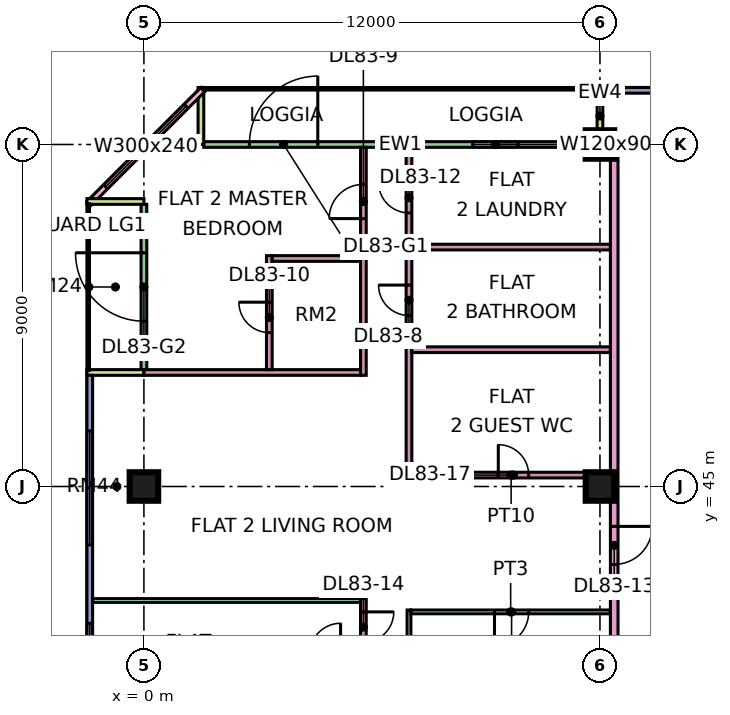
"""IFC4 building model, lengths in metres.
Left out: names, types, materials, properties, quantities, classifications, styles, units other than length and angle.
Written with IfcOpenShell. Run it as: python <this file> out.ifc"""

import sys

from ifc_helpers import new_model, si_unit, direction, frame, frame_2d, origin, origin_2d, place, context, subcontext, project, spatial, rectangle, extrude, element, fill, save


model = new_model("IFC4")
c1 = context("Model", 3, precision=1e-05, world=origin(), true_north=direction((0.0, 1.0)))
c2 = subcontext(c1, "Body", "Model", "MODEL_VIEW")
j1 = project(units=[si_unit("LENGTHUNIT", "METRE"), si_unit("PLANEANGLEUNIT", "RADIAN")], contexts=[c1])
p1 = place(None, origin())
s1 = spatial("IfcSite", under=j1, at=p1, CompositionType="ELEMENT")
p2 = place(p1, origin())
s2 = spatial("IfcBuilding", under=s1, at=p2, CompositionType="ELEMENT")
p3 = place(p2, frame((0.0, 0.0, 357.65)))
s3 = spatial("IfcBuildingStorey", under=s2, at=p3, CompositionType="ELEMENT", Elevation=357.65)
for number, where, z_axis, x_axis in (
    (1, (0.0, 45.0, 0.0), (0.0, 0.0, 1.0), (1.0, 0.0, 0.0)),
    (2, (12.0, 45.0, 0.0), (0.0, 0.0, 1.0), (1.0, 0.0, 0.0)),
    (3, (12.0, 54.0, 0.0), (0.0, 0.0, 1.0), (1.0, 0.0, 0.0)),
):
    element("IfcColumn", number, at=place(p3, frame(where, z_axis=z_axis, x_axis=x_axis)), inside=s3, PredefinedType="COLUMN", context=c2, shape_type="SweptSolid", body=[
        extrude(rectangle(XDim=0.75, YDim=0.75, at=origin_2d()), origin(), (0.0, 0.0, 1.0), 3.75),
    ])
p4 = place(p3, frame((22.5, 55.425, 0.0), z_axis=(0.0, 0.0, 1.0), x_axis=(-1.0, 0.0, 0.0)))
e4 = element("IfcWall", 4, at=p4, inside=s3, PredefinedType="SOLIDWALL", context=c2, shape_type="SweptSolid", body=[
    extrude(rectangle(XDim=10.425, YDim=0.15, at=frame_2d((5.212, 0.0))), origin(), (0.0, 0.0, 1.0), 3.35),
])
p5 = place(p4, frame((1.05, 0.0, 0.45)))
e5 = element("IfcOpeningElement", 5, at=p5, cuts=e4, PredefinedType="OPENING", context=c2, shape_type="SweptSolid", body=[
    extrude(rectangle(XDim=4.8, YDim=2.4, at=frame_2d((2.4, 1.2))), frame((0.0, 0.085, 0.0), z_axis=(0.0, -1.0, 0.0), x_axis=(1.0, 0.0, 0.0)), (0.0, 0.0, 1.0), 0.17),
])
p6 = place(p3, frame((11.925, 54.0, 0.0), z_axis=(0.0, 0.0, 1.0), x_axis=(-1.0, 0.0, 0.0)))
e6 = element("IfcWall", 6, at=p6, inside=s3, PredefinedType="SOLIDWALL", context=c2, shape_type="SweptSolid", body=[
    extrude(rectangle(XDim=10.35, YDim=0.15, at=frame_2d((5.175, 0.0))), origin(), (0.0, 0.0, 1.0), 3.35),
])
p7 = place(p6, frame((2.075, 0.0, 1.7)))
e7 = element("IfcOpeningElement", 7, at=p7, cuts=e6, PredefinedType="OPENING", context=c2, shape_type="SweptSolid", body=[
    extrude(rectangle(XDim=1.2, YDim=0.9, at=frame_2d((0.6, 0.45))), frame((0.0, 0.085, 0.0), z_axis=(0.0, -1.0, 0.0), x_axis=(1.0, 0.0, 0.0)), (0.0, 0.0, 1.0), 0.17),
])
p8 = place(p6, frame((7.35, 0.0, 0.0)))
e8 = element("IfcOpeningElement", 8, at=p8, cuts=e6, PredefinedType="OPENING", context=c2, shape_type="SweptSolid", body=[
    extrude(rectangle(XDim=1.8, YDim=2.4, at=frame_2d((0.9, 1.2))), frame((0.0, 0.085, 0.0), z_axis=(0.0, -1.0, 0.0), x_axis=(1.0, 0.0, 0.0)), (0.0, 0.0, 1.0), 0.17),
])
for number, where, z_axis, x_axis in (
    (9, (12.0, 55.5, 0.0), (0.0, 0.0, 1.0), (0.0, -1.0, 0.0)),
    (10, (1.5, 55.5, 0.0), (0.0, 0.0, 1.0), (0.0, -1.0, 0.0)),
):
    element("IfcWall", number, at=place(p3, frame(where, z_axis=z_axis, x_axis=x_axis)), inside=s3, PredefinedType="SOLIDWALL", context=c2, shape_type="SweptSolid", body=[
        extrude(rectangle(XDim=1.5, YDim=0.15, at=frame_2d((0.75, 0.0))), origin(), (0.0, 0.0, 1.0), 3.35),
    ])
p9 = place(p3, frame((1.553, 55.447, 0.0), z_axis=(0.0, 0.0, 1.0), x_axis=(-0.707106781187, -0.707106781187, 0.0)))
e11 = element("IfcWall", 11, at=p9, inside=s3, PredefinedType="SOLIDWALL", context=c2, shape_type="SweptSolid", body=[
    extrude(rectangle(XDim=4.243, YDim=0.15, at=frame_2d((2.121, 0.0))), origin(), (0.0, 0.0, 1.0), 3.35),
])
p10 = place(p9, frame((0.621, 0.0, 0.45)))
e12 = element("IfcOpeningElement", 12, at=p10, cuts=e11, PredefinedType="OPENING", context=c2, shape_type="SweptSolid", body=[
    extrude(rectangle(XDim=3.0, YDim=2.4, at=frame_2d((1.5, 1.2))), frame((0.0, 0.085, 0.0), z_axis=(0.0, -1.0, 0.0), x_axis=(1.0, 0.0, 0.0)), (0.0, 0.0, 1.0), 0.17),
])
p11 = place(p3, frame((0.0, 52.425, 0.0), z_axis=(0.0, 0.0, 1.0), x_axis=(0.0, -1.0, 0.0)))
e13 = element("IfcWall", 13, at=p11, inside=s3, PredefinedType="SOLIDWALL", context=c2, shape_type="SweptSolid", body=[
    extrude(rectangle(XDim=4.35, YDim=0.15, at=frame_2d((2.175, 0.0))), origin(), (0.0, 0.0, 1.0), 3.35),
])
p12 = place(p11, frame((1.275, 0.0, 0.0)))
e14 = element("IfcOpeningElement", 14, at=p12, cuts=e13, PredefinedType="OPENING", context=c2, shape_type="SweptSolid", body=[
    extrude(rectangle(XDim=1.8, YDim=2.4, at=frame_2d((0.9, 1.2))), frame((0.0, 0.085, 0.0), z_axis=(0.0, -1.0, 0.0), x_axis=(1.0, 0.0, 0.0)), (0.0, 0.0, 1.0), 0.17),
])
for number, where, z_axis, x_axis in (
    (15, (-1.5, 52.5, 0.0), (0.0, 0.0, 1.0), (1.0, 0.0, 0.0)),
    (16, (-1.5, 48.0, 0.0), (0.0, 0.0, 1.0), (1.0, 0.0, 0.0)),
):
    element("IfcWall", number, at=place(p3, frame(where, z_axis=z_axis, x_axis=x_axis)), inside=s3, PredefinedType="SOLIDWALL", context=c2, shape_type="SweptSolid", body=[
        extrude(rectangle(XDim=1.5, YDim=0.15, at=frame_2d((0.75, 0.0))), origin(), (0.0, 0.0, 1.0), 3.35),
    ])
p13 = place(p3, frame((-1.425, 47.925, 0.0), z_axis=(0.0, 0.0, 1.0), x_axis=(0.0, -1.0, 0.0)))
e17 = element("IfcWall", 17, at=p13, inside=s3, PredefinedType="SOLIDWALL", context=c2, shape_type="SweptSolid", body=[
    extrude(rectangle(XDim=11.85, YDim=0.15, at=frame_2d((5.925, 0.0))), origin(), (0.0, 0.0, 1.0), 3.35),
])
p14 = place(p13, frame((1.462, 0.0, 0.45)))
e18 = element("IfcOpeningElement", 18, at=p14, cuts=e17, PredefinedType="OPENING", context=c2, shape_type="SweptSolid", body=[
    extrude(rectangle(XDim=3.0, YDim=2.4, at=frame_2d((1.5, 1.2))), frame((0.0, 0.085, 0.0), z_axis=(0.0, -1.0, 0.0), x_axis=(1.0, 0.0, 0.0)), (0.0, 0.0, 1.0), 0.17),
])
p15 = place(p13, frame((6.525, 0.0, 0.45)))
e19 = element("IfcOpeningElement", 19, at=p15, cuts=e17, PredefinedType="OPENING", context=c2, shape_type="SweptSolid", body=[
    extrude(rectangle(XDim=1.8, YDim=2.4, at=frame_2d((0.9, 1.2))), frame((0.0, 0.085, 0.0), z_axis=(0.0, -1.0, 0.0), x_axis=(1.0, 0.0, 0.0)), (0.0, 0.0, 1.0), 0.17),
])
p16 = place(p13, frame((9.488, 0.0, 0.45)))
e20 = element("IfcOpeningElement", 20, at=p16, cuts=e17, PredefinedType="OPENING", context=c2, shape_type="SweptSolid", body=[
    extrude(rectangle(XDim=1.8, YDim=2.4, at=frame_2d((0.9, 1.2))), frame((0.0, 0.085, 0.0), z_axis=(0.0, -1.0, 0.0), x_axis=(1.0, 0.0, 0.0)), (0.0, 0.0, 1.0), 0.17),
])
p17 = place(p3, frame((-1.35, 42.0, 0.0), z_axis=(0.0, 0.0, 1.0), x_axis=(1.0, 0.0, 0.0)))
e21 = element("IfcWall", 21, at=p17, inside=s3, PredefinedType="PARTITIONING", context=c2, shape_type="SweptSolid", body=[
    extrude(rectangle(XDim=7.05, YDim=0.1, at=frame_2d((3.525, 0.0))), origin(), (0.0, 0.0, 1.0), 3.35),
])
p18 = place(p3, frame((0.0, 48.0, 0.0), z_axis=(0.0, 0.0, 1.0), x_axis=(1.0, 0.0, 0.0)))
e22 = element("IfcWall", 22, at=p18, inside=s3, PredefinedType="PARTITIONING", context=c2, shape_type="SweptSolid", body=[
    extrude(rectangle(XDim=5.7, YDim=0.15, at=frame_2d((2.85, 0.0))), origin(), (0.0, 0.0, 1.0), 3.35),
])
p19 = place(p3, frame((3.3, 48.075, 0.0), z_axis=(0.0, 0.0, 1.0), x_axis=(0.0, 1.0, 0.0)))
e23 = element("IfcWall", 23, at=p19, inside=s3, PredefinedType="PARTITIONING", context=c2, shape_type="SweptSolid", body=[
    extrude(rectangle(XDim=3.0, YDim=0.15, at=frame_2d((1.5, 0.0))), origin(), (0.0, 0.0, 1.0), 3.35),
])
p20 = place(p19, frame((0.975, 0.0, 0.0)))
e24 = element("IfcOpeningElement", 24, at=p20, cuts=e23, PredefinedType="OPENING", context=c2, shape_type="SweptSolid", body=[
    extrude(rectangle(XDim=0.8, YDim=2.1, at=frame_2d((0.4, 1.05))), frame((0.0, 0.085, 0.0), z_axis=(0.0, -1.0, 0.0), x_axis=(1.0, 0.0, 0.0)), (0.0, 0.0, 1.0), 0.17),
])
p21 = place(p3, frame((3.375, 51.0, 0.0), z_axis=(0.0, 0.0, 1.0), x_axis=(1.0, 0.0, 0.0)))
e25 = element("IfcWall", 25, at=p21, inside=s3, PredefinedType="PARTITIONING", context=c2, shape_type="SweptSolid", body=[
    extrude(rectangle(XDim=2.325, YDim=0.15, at=frame_2d((1.163, 0.0))), origin(), (0.0, 0.0, 1.0), 3.35),
])
p22 = place(p3, frame((5.775, 36.1, 0.0), z_axis=(0.0, 0.0, 1.0), x_axis=(0.0, 1.0, 0.0)))
e26 = element("IfcWall", 26, at=p22, inside=s3, PredefinedType="PARTITIONING", context=c2, shape_type="SweptSolid", body=[
    extrude(rectangle(XDim=5.95, YDim=0.15, at=frame_2d((2.975, 0.0))), origin(), (0.0, 0.0, 1.0), 3.35),
])
p23 = place(p22, frame((4.8, 0.0, 0.0)))
e27 = element("IfcOpeningElement", 27, at=p23, cuts=e26, PredefinedType="OPENING", context=c2, shape_type="SweptSolid", body=[
    extrude(rectangle(XDim=0.8, YDim=2.1, at=frame_2d((0.4, 1.05))), frame((0.0, 0.085, 0.0), z_axis=(0.0, -1.0, 0.0), x_axis=(1.0, 0.0, 0.0)), (0.0, 0.0, 1.0), 0.17),
])
p24 = place(p22, frame((0.55, 0.0, 0.0)))
e28 = element("IfcOpeningElement", 28, at=p24, cuts=e26, PredefinedType="OPENING", context=c2, shape_type="SweptSolid", body=[
    extrude(rectangle(XDim=1.6, YDim=2.1, at=frame_2d((0.8, 1.05))), frame((0.0, 0.085, 0.0), z_axis=(0.0, -1.0, 0.0), x_axis=(1.0, 0.0, 0.0)), (0.0, 0.0, 1.0), 0.17),
])
p25 = place(p3, frame((5.775, 47.925, 0.0), z_axis=(0.0, 0.0, 1.0), x_axis=(0.0, 1.0, 0.0)))
e29 = element("IfcWall", 29, at=p25, inside=s3, PredefinedType="PARTITIONING", context=c2, shape_type="SweptSolid", body=[
    extrude(rectangle(XDim=6.001, YDim=0.15, at=frame_2d((3.0, 0.0))), origin(), (0.0, 0.0, 1.0), 3.35),
])
p26 = place(p25, frame((4.125, 0.0, 0.0)))
e30 = element("IfcOpeningElement", 30, at=p26, cuts=e29, PredefinedType="OPENING", context=c2, shape_type="SweptSolid", body=[
    extrude(rectangle(XDim=0.9, YDim=2.1, at=frame_2d((0.45, 1.05))), frame((0.0, 0.085, 0.0), z_axis=(0.0, -1.0, 0.0), x_axis=(1.0, 0.0, 0.0)), (0.0, 0.0, 1.0), 0.17),
])
p27 = place(p3, frame((6.975, 36.1, 0.0), z_axis=(0.0, 0.0, 1.0), x_axis=(0.0, 1.0, 0.0)))
e31 = element("IfcWall", 31, at=p27, inside=s3, PredefinedType="PARTITIONING", context=c2, shape_type="SweptSolid", body=[
    extrude(rectangle(XDim=5.65, YDim=0.1, at=frame_2d((2.825, 0.0))), origin(), (0.0, 0.0, 1.0), 3.35),
])
p28 = place(p3, frame((6.975, 45.225, 0.0), z_axis=(0.0, 0.0, 1.0), x_axis=(0.0, 1.0, 0.0)))
e32 = element("IfcWall", 32, at=p28, inside=s3, PredefinedType="PARTITIONING", context=c2, shape_type="SweptSolid", body=[
    extrude(rectangle(XDim=8.701, YDim=0.15, at=frame_2d((4.351, 0.0))), origin(), (0.0, 0.0, 1.0), 3.35),
])
p29 = place(p28, frame((4.275, 0.0, 0.0)))
e33 = element("IfcOpeningElement", 33, at=p29, cuts=e32, PredefinedType="OPENING", context=c2, shape_type="SweptSolid", body=[
    extrude(rectangle(XDim=0.8, YDim=2.1, at=frame_2d((0.4, 1.05))), frame((0.0, 0.085, 0.0), z_axis=(0.0, -1.0, 0.0), x_axis=(1.0, 0.0, 0.0)), (0.0, 0.0, 1.0), 0.17),
])
p30 = place(p28, frame((6.975, 0.0, 0.0)))
e34 = element("IfcOpeningElement", 34, at=p30, cuts=e32, PredefinedType="OPENING", context=c2, shape_type="SweptSolid", body=[
    extrude(rectangle(XDim=0.8, YDim=2.1, at=frame_2d((0.4, 1.05))), frame((0.0, 0.085, 0.0), z_axis=(0.0, -1.0, 0.0), x_axis=(1.0, 0.0, 0.0)), (0.0, 0.0, 1.0), 0.17),
])
p31 = place(p3, frame((7.025, 41.7, 0.0), z_axis=(0.0, 0.0, 1.0), x_axis=(1.0, 0.0, 0.0)))
e35 = element("IfcWall", 35, at=p31, inside=s3, PredefinedType="PARTITIONING", context=c2, shape_type="SweptSolid", body=[
    extrude(rectangle(XDim=5.25, YDim=0.1, at=frame_2d((2.625, 0.0))), origin(), (0.0, 0.0, 1.0), 3.35),
])
p32 = place(p31, frame((2.2, 0.0, 0.0)))
e36 = element("IfcOpeningElement", 36, at=p32, cuts=e35, PredefinedType="OPENING", context=c2, shape_type="SweptSolid", body=[
    extrude(rectangle(XDim=0.9, YDim=2.1, at=frame_2d((0.45, 1.05))), frame((0.0, 0.06, 0.0), z_axis=(0.0, -1.0, 0.0), x_axis=(1.0, 0.0, 0.0)), (0.0, 0.0, 1.0), 0.12),
])
p33 = place(p3, frame((7.05, 45.3, 0.0), z_axis=(0.0, 0.0, 1.0), x_axis=(1.0, 0.0, 0.0)))
e37 = element("IfcWall", 37, at=p33, inside=s3, PredefinedType="PARTITIONING", context=c2, shape_type="SweptSolid", body=[
    extrude(rectangle(XDim=5.225, YDim=0.15, at=frame_2d((2.612, 0.0))), origin(), (0.0, 0.0, 1.0), 3.35),
])
p34 = place(p33, frame((2.275, 0.0, 0.0)))
e38 = element("IfcOpeningElement", 38, at=p34, cuts=e37, PredefinedType="OPENING", context=c2, shape_type="SweptSolid", body=[
    extrude(rectangle(XDim=0.8, YDim=2.1, at=frame_2d((0.4, 1.05))), frame((0.0, 0.085, 0.0), z_axis=(0.0, -1.0, 0.0), x_axis=(1.0, 0.0, 0.0)), (0.0, 0.0, 1.0), 0.17),
])
for number, where, z_axis, x_axis in (
    (39, (7.05, 48.6, 0.0), (0.0, 0.0, 1.0), (1.0, 0.0, 0.0)),
    (40, (7.05, 51.3, 0.0), (0.0, 0.0, 1.0), (1.0, 0.0, 0.0)),
):
    element("IfcWall", number, at=place(p3, frame(where, z_axis=z_axis, x_axis=x_axis)), inside=s3, PredefinedType="PARTITIONING", context=c2, shape_type="SweptSolid", body=[
        extrude(rectangle(XDim=5.225, YDim=0.15, at=frame_2d((2.612, 0.0))), origin(), (0.0, 0.0, 1.0), 3.35),
    ])
p35 = place(p3, frame((12.375, 20.0, 0.0), z_axis=(0.0, 0.0, 1.0), x_axis=(0.0, 1.0, 0.0)))
e41 = element("IfcWall", 41, at=p35, inside=s3, PredefinedType="PARTITIONING", context=c2, shape_type="SweptSolid", body=[
    extrude(rectangle(XDim=34.0, YDim=0.2, at=frame_2d((17.0, 0.0))), origin(), (0.0, 0.0, 1.0), 3.35),
])
p36 = place(p35, frame((22.95, 0.0, 0.0)))
e42 = element("IfcOpeningElement", 42, at=p36, cuts=e41, PredefinedType="OPENING", context=c2, shape_type="SweptSolid", body=[
    extrude(rectangle(XDim=1.0, YDim=2.1, at=frame_2d((0.5, 1.05))), frame((0.0, 0.11, 0.0), z_axis=(0.0, -1.0, 0.0), x_axis=(1.0, 0.0, 0.0)), (0.0, 0.0, 1.0), 0.22),
])
p37 = place(p35, frame((0.6, 0.0, 0.0)))
e43 = element("IfcOpeningElement", 43, at=p37, cuts=e41, PredefinedType="OPENING", context=c2, shape_type="SweptSolid", body=[
    extrude(rectangle(XDim=1.2, YDim=2.1, at=frame_2d((0.6, 1.05))), frame((0.0, 0.11, 0.0), z_axis=(0.0, -1.0, 0.0), x_axis=(1.0, 0.0, 0.0)), (0.0, 0.0, 1.0), 0.22),
])
p38 = place(p35, frame((13.65, 0.0, 0.0)))
e44 = element("IfcOpeningElement", 44, at=p38, cuts=e41, PredefinedType="OPENING", context=c2, shape_type="SweptSolid", body=[
    extrude(rectangle(XDim=1.0, YDim=2.1, at=frame_2d((0.5, 1.05))), frame((0.0, 0.11, 0.0), z_axis=(0.0, -1.0, 0.0), x_axis=(1.0, 0.0, 0.0)), (0.0, 0.0, 1.0), 0.22),
])
p39 = place(p7, origin())
e45 = element("IfcWindow", 45, at=p39, inside=s3, PartitioningType="SINGLE_PANEL", PredefinedType="WINDOW", context=c2, shape_type="SweptSolid", body=[
    extrude(rectangle(XDim=1.2, YDim=0.9, at=frame_2d((0.6, 0.45))), frame((0.0, 0.03, 0.0), z_axis=(0.0, -1.0, 0.0), x_axis=(1.0, 0.0, 0.0)), (0.0, 0.0, 1.0), 0.06),
])
fill(e7, e45)
p40 = place(p8, frame((1.8, 0.0, 0.0), z_axis=(0.0, 0.0, 1.0), x_axis=(-1.0, 0.0, 0.0)))
e46 = element("IfcDoor", 46, at=p40, inside=s3, OperationType="DOUBLE_DOOR_SINGLE_SWING", PredefinedType="DOOR", context=c2, shape_type="SweptSolid", body=[
    extrude(rectangle(XDim=1.8, YDim=2.4, at=frame_2d((0.9, 1.2))), frame((0.0, 0.025, 0.0), z_axis=(0.0, -1.0, 0.0), x_axis=(1.0, 0.0, 0.0)), (0.0, 0.0, 1.0), 0.05),
])
fill(e8, e46)
p41 = place(p10, origin())
e47 = element("IfcWindow", 47, at=p41, inside=s3, PartitioningType="SINGLE_PANEL", PredefinedType="WINDOW", context=c2, shape_type="SweptSolid", body=[
    extrude(rectangle(XDim=3.0, YDim=2.4, at=frame_2d((1.5, 1.2))), frame((0.0, 0.03, 0.0), z_axis=(0.0, -1.0, 0.0), x_axis=(1.0, 0.0, 0.0)), (0.0, 0.0, 1.0), 0.06),
])
fill(e12, e47)
p42 = place(p12, frame((1.8, 0.0, 0.0), z_axis=(0.0, 0.0, 1.0), x_axis=(-1.0, 0.0, 0.0)))
e48 = element("IfcDoor", 48, at=p42, inside=s3, OperationType="DOUBLE_DOOR_SINGLE_SWING", PredefinedType="DOOR", context=c2, shape_type="SweptSolid", body=[
    extrude(rectangle(XDim=1.8, YDim=2.4, at=frame_2d((0.9, 1.2))), frame((0.0, 0.025, 0.0), z_axis=(0.0, -1.0, 0.0), x_axis=(1.0, 0.0, 0.0)), (0.0, 0.0, 1.0), 0.05),
])
fill(e14, e48)
p43 = place(p14, origin())
e49 = element("IfcWindow", 49, at=p43, inside=s3, PartitioningType="SINGLE_PANEL", PredefinedType="WINDOW", context=c2, shape_type="SweptSolid", body=[
    extrude(rectangle(XDim=3.0, YDim=2.4, at=frame_2d((1.5, 1.2))), frame((0.0, 0.03, 0.0), z_axis=(0.0, -1.0, 0.0), x_axis=(1.0, 0.0, 0.0)), (0.0, 0.0, 1.0), 0.06),
])
fill(e18, e49)
p44 = place(p15, origin())
e50 = element("IfcWindow", 50, at=p44, inside=s3, PartitioningType="SINGLE_PANEL", PredefinedType="WINDOW", context=c2, shape_type="SweptSolid", body=[
    extrude(rectangle(XDim=1.8, YDim=2.4, at=frame_2d((0.9, 1.2))), frame((0.0, 0.03, 0.0), z_axis=(0.0, -1.0, 0.0), x_axis=(1.0, 0.0, 0.0)), (0.0, 0.0, 1.0), 0.06),
])
fill(e19, e50)
p45 = place(p29, frame((0.8, 0.0, 0.0), z_axis=(0.0, 0.0, 1.0), x_axis=(-1.0, 0.0, 0.0)))
e51 = element("IfcDoor", 51, at=p45, inside=s3, OperationType="SINGLE_SWING_RIGHT", PredefinedType="DOOR", context=c2, shape_type="SweptSolid", body=[
    extrude(rectangle(XDim=0.8, YDim=2.1, at=frame_2d((0.4, 1.05))), frame((0.0, 0.025, 0.0), z_axis=(0.0, -1.0, 0.0), x_axis=(1.0, 0.0, 0.0)), (0.0, 0.0, 1.0), 0.05),
])
fill(e33, e51)
p46 = place(p26, origin())
e52 = element("IfcDoor", 52, at=p46, inside=s3, OperationType="SINGLE_SWING_LEFT", PredefinedType="DOOR", context=c2, shape_type="SweptSolid", body=[
    extrude(rectangle(XDim=0.9, YDim=2.1, at=frame_2d((0.45, 1.05))), frame((0.0, 0.025, 0.0), z_axis=(0.0, -1.0, 0.0), x_axis=(1.0, 0.0, 0.0)), (0.0, 0.0, 1.0), 0.05),
])
fill(e30, e52)
p47 = place(p20, frame((0.8, 0.0, 0.0), z_axis=(0.0, 0.0, 1.0), x_axis=(-1.0, 0.0, 0.0)))
e53 = element("IfcDoor", 53, at=p47, inside=s3, OperationType="SINGLE_SWING_RIGHT", PredefinedType="DOOR", context=c2, shape_type="SweptSolid", body=[
    extrude(rectangle(XDim=0.8, YDim=2.1, at=frame_2d((0.4, 1.05))), frame((0.0, 0.025, 0.0), z_axis=(0.0, -1.0, 0.0), x_axis=(1.0, 0.0, 0.0)), (0.0, 0.0, 1.0), 0.05),
])
fill(e24, e53)
p48 = place(p32, frame((0.9, 0.0, 0.0), z_axis=(0.0, 0.0, 1.0), x_axis=(-1.0, 0.0, 0.0)))
e54 = element("IfcDoor", 54, at=p48, inside=s3, OperationType="SINGLE_SWING_LEFT", PredefinedType="DOOR", context=c2, shape_type="SweptSolid", body=[
    extrude(rectangle(XDim=0.9, YDim=2.1, at=frame_2d((0.45, 1.05))), frame((0.0, 0.025, 0.0), z_axis=(0.0, -1.0, 0.0), x_axis=(1.0, 0.0, 0.0)), (0.0, 0.0, 1.0), 0.05),
])
fill(e36, e54)
p49 = place(p30, frame((0.8, 0.0, 0.0), z_axis=(0.0, 0.0, 1.0), x_axis=(-1.0, 0.0, 0.0)))
e55 = element("IfcDoor", 55, at=p49, inside=s3, OperationType="SINGLE_SWING_RIGHT", PredefinedType="DOOR", context=c2, shape_type="SweptSolid", body=[
    extrude(rectangle(XDim=0.8, YDim=2.1, at=frame_2d((0.4, 1.05))), frame((0.0, 0.025, 0.0), z_axis=(0.0, -1.0, 0.0), x_axis=(1.0, 0.0, 0.0)), (0.0, 0.0, 1.0), 0.05),
])
fill(e34, e55)
p50 = place(p36, origin())
e56 = element("IfcDoor", 56, at=p50, inside=s3, OperationType="SINGLE_SWING_RIGHT", PredefinedType="DOOR", context=c2, shape_type="SweptSolid", body=[
    extrude(rectangle(XDim=1.0, YDim=2.1, at=frame_2d((0.5, 1.05))), frame((0.0, 0.025, 0.0), z_axis=(0.0, -1.0, 0.0), x_axis=(1.0, 0.0, 0.0)), (0.0, 0.0, 1.0), 0.05),
])
fill(e42, e56)
p51 = place(p23, origin())
e57 = element("IfcDoor", 57, at=p51, inside=s3, OperationType="SINGLE_SWING_RIGHT", PredefinedType="DOOR", context=c2, shape_type="SweptSolid", body=[
    extrude(rectangle(XDim=0.8, YDim=2.1, at=frame_2d((0.4, 1.05))), frame((0.0, 0.025, 0.0), z_axis=(0.0, -1.0, 0.0), x_axis=(1.0, 0.0, 0.0)), (0.0, 0.0, 1.0), 0.05),
])
fill(e27, e57)
p52 = place(p34, origin())
e58 = element("IfcDoor", 58, at=p52, inside=s3, OperationType="SINGLE_SWING_LEFT", PredefinedType="DOOR", context=c2, shape_type="SweptSolid", body=[
    extrude(rectangle(XDim=0.8, YDim=2.1, at=frame_2d((0.4, 1.05))), frame((0.0, 0.025, 0.0), z_axis=(0.0, -1.0, 0.0), x_axis=(1.0, 0.0, 0.0)), (0.0, 0.0, 1.0), 0.05),
])
fill(e38, e58)
save(model, sys.argv[1])
